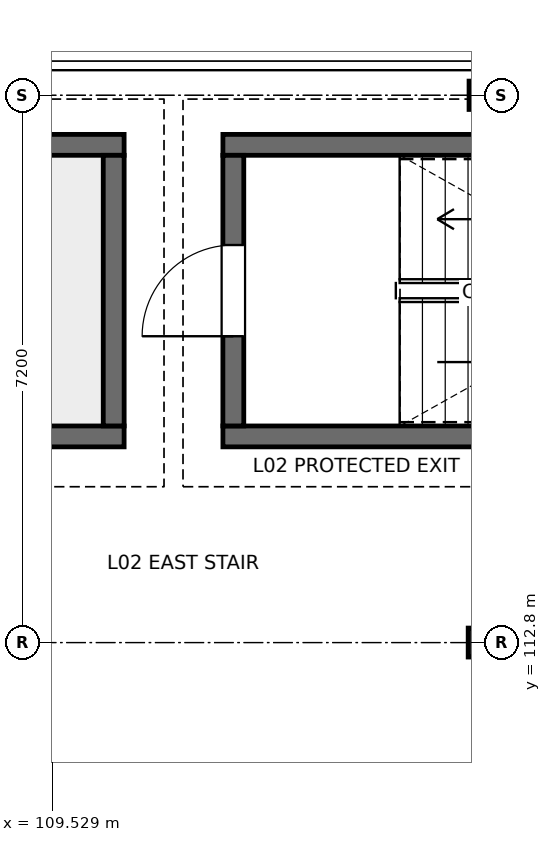
"""IFC4 building model, lengths in metres.
Left out: names, types, materials, properties, quantities, classifications, styles, units other than length and angle.
Written with IfcOpenShell. Run it as: python <this file> out.ifc"""

import sys

from ifc_helpers import new_model, si_unit, direction, frame, frame_2d, origin, origin_2d, place, context, subcontext, project, spatial, rectangle, i_section, extrude, element, fill, save


model = new_model("IFC4")
c1 = context("Model", 3, precision=1e-05, world=origin(), true_north=direction((0.0, 1.0)))
c2 = subcontext(c1, "Body", "Model", "MODEL_VIEW")
j1 = project(units=[si_unit("LENGTHUNIT", "METRE"), si_unit("PLANEANGLEUNIT", "RADIAN")], contexts=[c1])
p1 = place(None, origin())
s1 = spatial("IfcSite", under=j1, at=p1, CompositionType="ELEMENT")
p2 = place(p1, origin())
s2 = spatial("IfcBuilding", under=s1, at=p2, CompositionType="ELEMENT")
p3 = place(p2, frame((0.0, 0.0, 9.3)))
s3 = spatial("IfcBuildingStorey", under=s2, at=p3, CompositionType="ELEMENT", Elevation=9.3)
p4 = place(p3, frame((115.2, 112.8, 0.0), z_axis=(0.0, 0.0, 1.0), x_axis=(1.0, 0.0, 0.0)))
e1 = element("IfcColumn", 1, at=p4, inside=s3, PredefinedType="COLUMN", context=c2, shape_type="SweptSolid", body=[
    extrude(i_section(OverallWidth=0.396, OverallDepth=0.381, WebThickness=0.019, FlangeThickness=0.03, FilletRadius=0.015, at=origin_2d()), origin(), (0.0, 0.0, 1.0), 3.9),
])
p5 = place(p3, frame((115.2, 120.0, 0.0), z_axis=(0.0, 0.0, 1.0), x_axis=(1.0, 0.0, 0.0)))
e2 = element("IfcColumn", 2, at=p5, inside=s3, PredefinedType="COLUMN", context=c2, shape_type="SweptSolid", body=[
    extrude(i_section(OverallWidth=0.373, OverallDepth=0.373, WebThickness=0.016, FlangeThickness=0.026, FilletRadius=0.015, at=origin_2d()), origin(), (0.0, 0.0, 1.0), 3.9),
])
for number, where, z_axis, x_axis in (
    (3, (110.475, 115.512, 0.0), (0.0, 0.0, 1.0), (-1.0, 0.0, 0.0)),
    (4, (101.575, 119.348, 0.0), (0.0, 0.0, 1.0), (1.0, 0.0, 0.0)),
):
    element("IfcWall", number, at=place(p3, frame(where, z_axis=z_axis, x_axis=x_axis)), inside=s3, PredefinedType="SOLIDWALL", context=c2, shape_type="SweptSolid", body=[
        extrude(rectangle(XDim=8.9, YDim=0.275, at=frame_2d((4.45, 0.0))), origin(), (0.0, 0.0, 1.0), 3.69),
    ])
p6 = place(p3, frame((110.338, 119.21, 0.0), z_axis=(0.0, 0.0, 1.0), x_axis=(0.0, -1.0, 0.0)))
e5 = element("IfcWall", 5, at=p6, inside=s3, PredefinedType="SOLIDWALL", context=c2, shape_type="SweptSolid", body=[
    extrude(rectangle(XDim=3.56, YDim=0.275, at=frame_2d((1.78, 0.0))), origin(), (0.0, 0.0, 1.0), 3.69),
])
for number, where, z_axis, x_axis in (
    (6, (120.725, 115.512, 0.0), (0.0, 0.0, 1.0), (-1.0, 0.0, 0.0)),
    (7, (111.775, 119.348, 0.0), (0.0, 0.0, 1.0), (1.0, 0.0, 0.0)),
):
    element("IfcWall", number, at=place(p3, frame(where, z_axis=z_axis, x_axis=x_axis)), inside=s3, PredefinedType="SOLIDWALL", context=c2, shape_type="SweptSolid", body=[
        extrude(rectangle(XDim=8.95, YDim=0.275, at=frame_2d((4.475, 0.0))), origin(), (0.0, 0.0, 1.0), 3.69),
    ])
p7 = place(p3, frame((111.912, 115.65, 0.0), z_axis=(0.0, 0.0, 1.0), x_axis=(0.0, 1.0, 0.0)))
e8 = element("IfcWall", 8, at=p7, inside=s3, PredefinedType="SOLIDWALL", context=c2, shape_type="SweptSolid", body=[
    extrude(rectangle(XDim=3.56, YDim=0.275, at=frame_2d((1.78, 0.0))), origin(), (0.0, 0.0, 1.0), 3.69),
])
p8 = place(p7, frame((1.18, 0.0, 0.0)))
e9 = element("IfcOpeningElement", 9, at=p8, cuts=e8, PredefinedType="OPENING", context=c2, shape_type="SweptSolid", body=[
    extrude(rectangle(XDim=1.2, YDim=2.2, at=frame_2d((0.6, 1.1))), frame((0.0, 0.147, 0.0), z_axis=(0.0, -1.0, 0.0), x_axis=(1.0, 0.0, 0.0)), (0.0, 0.0, 1.0), 0.295),
])
p9 = place(p8, origin())
e10 = element("IfcDoor", 10, at=p9, inside=s3, OperationType="SINGLE_SWING_LEFT", PredefinedType="DOOR", context=c2, shape_type="SweptSolid", body=[
    extrude(rectangle(XDim=1.2, YDim=2.2, at=frame_2d((0.6, 1.1))), frame((0.0, 0.025, 0.0), z_axis=(0.0, -1.0, 0.0), x_axis=(1.0, 0.0, 0.0)), (0.0, 0.0, 1.0), 0.05),
])
fill(e9, e10)
save(model, sys.argv[1])
